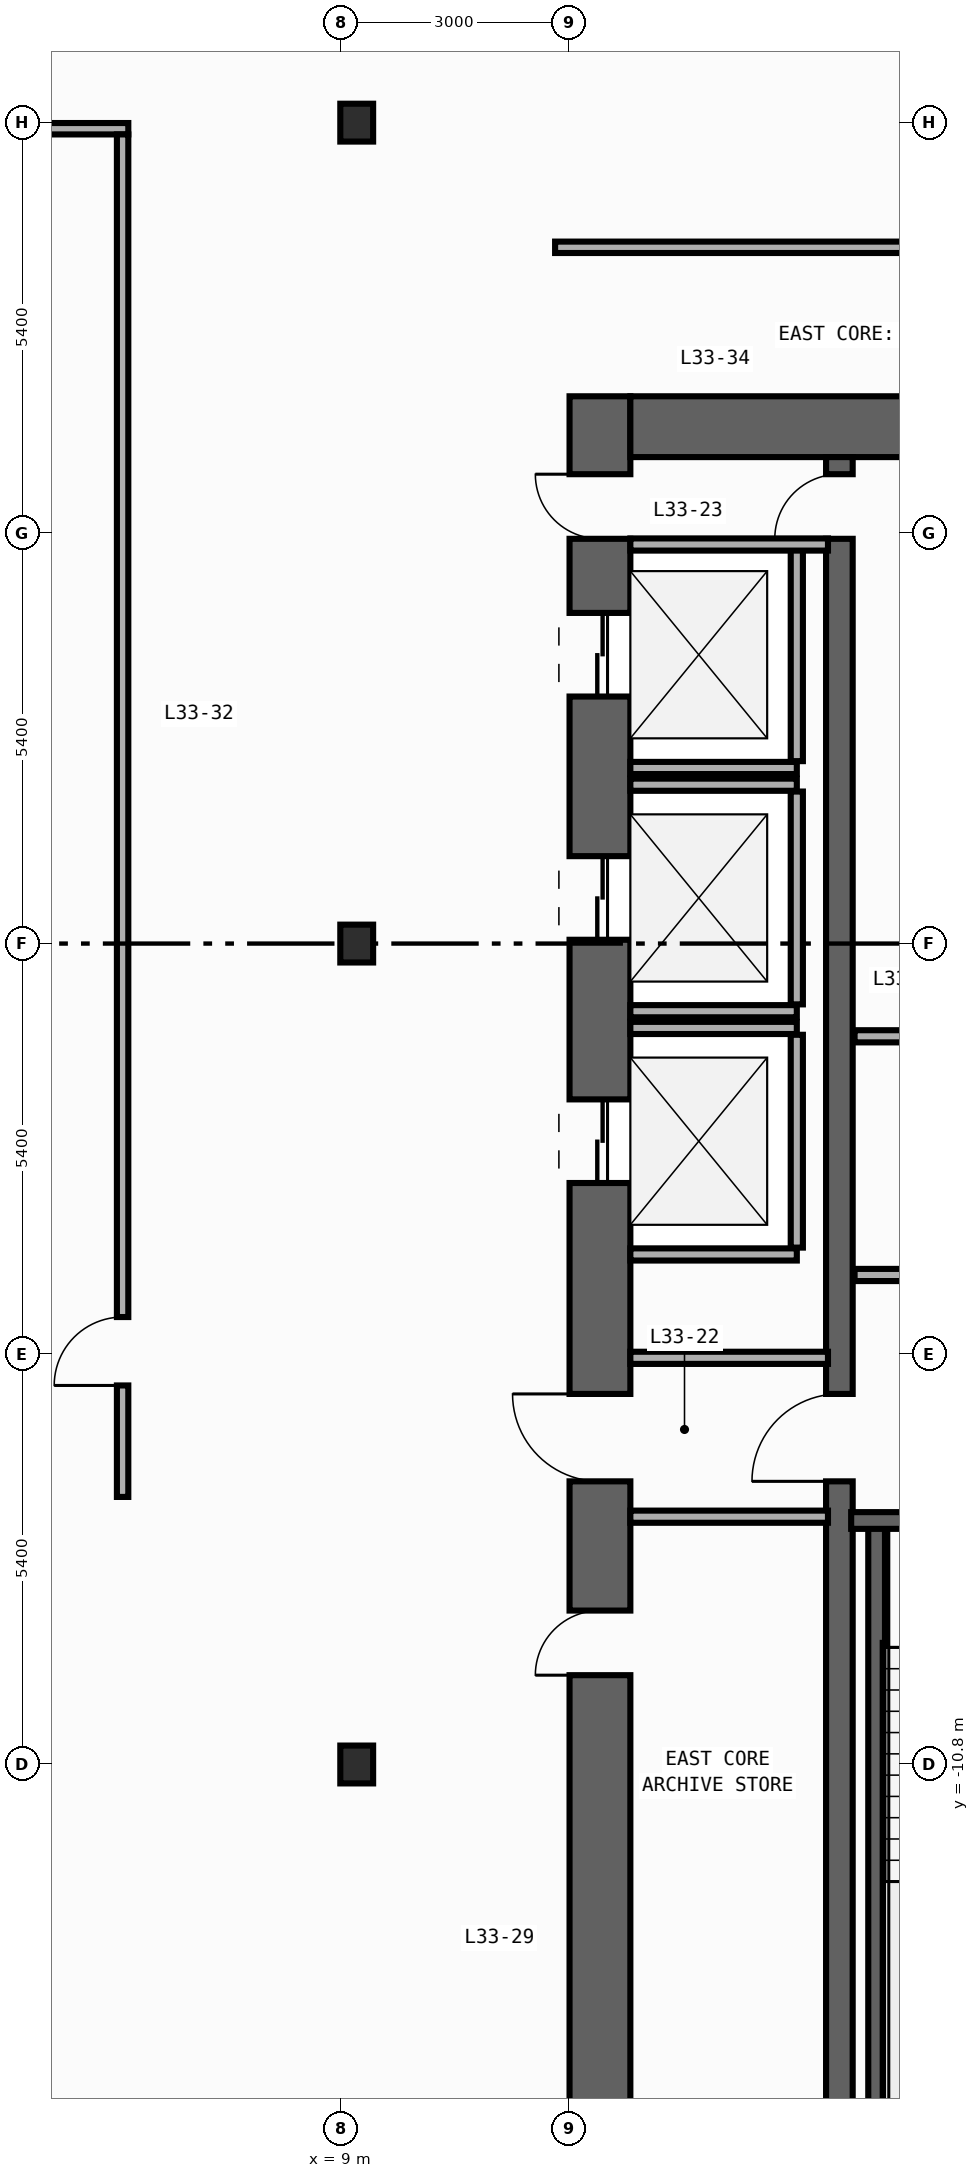
"""IFC4 building model, lengths in metres.
Left out: names, types, materials, properties, quantities, classifications, styles, units other than length and angle.
Written with IfcOpenShell. Run it as: python <this file> out.ifc"""

import sys

from ifc_helpers import new_model, si_unit, direction, frame, frame_2d, origin, origin_2d, place, context, subcontext, project, spatial, rectangle, i_section, extrude, element, fill, save


model = new_model("IFC4")
c1 = context("Model", 3, precision=1e-05, world=origin(), true_north=direction((0.0, 1.0)))
c2 = subcontext(c1, "Body", "Model", "MODEL_VIEW")
j1 = project(units=[si_unit("LENGTHUNIT", "METRE"), si_unit("PLANEANGLEUNIT", "RADIAN")], contexts=[c1])
p1 = place(None, origin())
s1 = spatial("IfcSite", under=j1, at=p1, CompositionType="ELEMENT")
p2 = place(p1, origin())
s2 = spatial("IfcBuilding", under=s1, at=p2, CompositionType="ELEMENT")
p3 = place(p2, frame((0.0, 0.0, 143.6)))
s3 = spatial("IfcBuildingStorey", under=s2, at=p3, CompositionType="ELEMENT", Elevation=143.6)
p4 = place(p3, frame((12.4, -19.8, 0.0), z_axis=(0.0, 0.0, 1.0), x_axis=(0.0, 1.0, 0.0)))
e1 = element("IfcWall", 1, at=p4, inside=s3, PredefinedType="SHEAR", context=c2, shape_type="SweptSolid", body=[
    extrude(rectangle(XDim=27.0, YDim=0.8, at=frame_2d((13.5, 0.0))), origin(), (0.0, 0.0, 1.0), 3.94),
])
p5 = place(p4, frame((23.05, 0.0, 0.0)))
e2 = element("IfcOpeningElement", 2, at=p5, cuts=e1, PredefinedType="OPENING", context=c2, shape_type="SweptSolid", body=[
    extrude(rectangle(XDim=1.1, YDim=2.2, at=frame_2d((0.55, 1.1))), frame((0.0, 0.41, 0.0), z_axis=(0.0, -1.0, 0.0), x_axis=(1.0, 0.0, 0.0)), (0.0, 0.0, 1.0), 0.82),
])
p6 = place(p4, frame((19.85, 0.0, 0.0)))
e3 = element("IfcOpeningElement", 3, at=p6, cuts=e1, PredefinedType="OPENING", context=c2, shape_type="SweptSolid", body=[
    extrude(rectangle(XDim=1.1, YDim=2.2, at=frame_2d((0.55, 1.1))), frame((0.0, 0.41, 0.0), z_axis=(0.0, -1.0, 0.0), x_axis=(1.0, 0.0, 0.0)), (0.0, 0.0, 1.0), 0.82),
])
p7 = place(p4, frame((16.65, 0.0, 0.0)))
e4 = element("IfcOpeningElement", 4, at=p7, cuts=e1, PredefinedType="OPENING", context=c2, shape_type="SweptSolid", body=[
    extrude(rectangle(XDim=1.1, YDim=2.2, at=frame_2d((0.55, 1.1))), frame((0.0, 0.41, 0.0), z_axis=(0.0, -1.0, 0.0), x_axis=(1.0, 0.0, 0.0)), (0.0, 0.0, 1.0), 0.82),
])
p8 = place(p4, frame((10.175, 0.0, 0.0)))
e5 = element("IfcOpeningElement", 5, at=p8, cuts=e1, PredefinedType="OPENING", context=c2, shape_type="SweptSolid", body=[
    extrude(rectangle(XDim=0.85, YDim=2.1, at=frame_2d((0.425, 1.05))), frame((0.0, 0.41, 0.0), z_axis=(0.0, -1.0, 0.0), x_axis=(1.0, 0.0, 0.0)), (0.0, 0.0, 1.0), 0.82),
])
p9 = place(p4, frame((12.725, 0.0, 0.0)))
e6 = element("IfcOpeningElement", 6, at=p9, cuts=e1, PredefinedType="OPENING", context=c2, shape_type="SweptSolid", body=[
    extrude(rectangle(XDim=1.15, YDim=2.2, at=frame_2d((0.575, 1.1))), frame((0.0, 0.41, 0.0), z_axis=(0.0, -1.0, 0.0), x_axis=(1.0, 0.0, 0.0)), (0.0, 0.0, 1.0), 0.82),
])
p10 = place(p4, frame((25.125, 0.0, 0.0)))
e7 = element("IfcOpeningElement", 7, at=p10, cuts=e1, PredefinedType="OPENING", context=c2, shape_type="SweptSolid", body=[
    extrude(rectangle(XDim=0.85, YDim=2.1, at=frame_2d((0.425, 1.05))), frame((0.0, 0.41, 0.0), z_axis=(0.0, -1.0, 0.0), x_axis=(1.0, 0.0, 0.0)), (0.0, 0.0, 1.0), 0.82),
])
p11 = place(p3, frame((12.8, 6.8, 0.0), z_axis=(0.0, 0.0, 1.0), x_axis=(1.0, 0.0, 0.0)))
e8 = element("IfcWall", 8, at=p11, inside=s3, PredefinedType="SHEAR", context=c2, shape_type="SweptSolid", body=[
    extrude(rectangle(XDim=6.8, YDim=0.8, at=frame_2d((3.4, 0.0))), origin(), (0.0, 0.0, 1.0), 3.94),
])
p12 = place(p3, frame((15.55, -19.0, 0.0), z_axis=(0.0, 0.0, 1.0), x_axis=(0.0, 1.0, 0.0)))
e9 = element("IfcWall", 9, at=p12, inside=s3, PredefinedType="SHEAR", context=c2, shape_type="SweptSolid", body=[
    extrude(rectangle(XDim=25.4, YDim=0.35, at=frame_2d((12.7, 0.0))), origin(), (0.0, 0.0, 1.0), 3.94),
])
p13 = place(p12, frame((11.925, 0.0, 0.0)))
e10 = element("IfcOpeningElement", 10, at=p13, cuts=e9, PredefinedType="OPENING", context=c2, shape_type="SweptSolid", body=[
    extrude(rectangle(XDim=1.15, YDim=2.2, at=frame_2d((0.575, 1.1))), frame((0.0, 0.185, 0.0), z_axis=(0.0, -1.0, 0.0), x_axis=(1.0, 0.0, 0.0)), (0.0, 0.0, 1.0), 0.37),
])
p14 = place(p12, frame((24.325, 0.0, 0.0)))
e11 = element("IfcOpeningElement", 11, at=p14, cuts=e9, PredefinedType="OPENING", context=c2, shape_type="SweptSolid", body=[
    extrude(rectangle(XDim=0.85, YDim=2.1, at=frame_2d((0.425, 1.05))), frame((0.0, 0.185, 0.0), z_axis=(0.0, -1.0, 0.0), x_axis=(1.0, 0.0, 0.0)), (0.0, 0.0, 1.0), 0.37),
])
p15 = place(p3, frame((16.04, -18.89, 0.0), z_axis=(0.0, 0.0, 1.0), x_axis=(0.0, 1.0, 0.0)))
e12 = element("IfcWall", 12, at=p15, inside=s3, PredefinedType="SHEAR", context=c2, shape_type="SweptSolid", body=[
    extrude(rectangle(XDim=11.3, YDim=0.22, at=frame_2d((5.65, 0.0))), origin(), (0.0, 0.0, 1.0), 3.94),
])
p16 = place(p3, frame((19.62, -7.59, 0.0), z_axis=(0.0, 0.0, 1.0), x_axis=(-1.0, 0.0, 0.0)))
e13 = element("IfcWall", 13, at=p16, inside=s3, PredefinedType="SHEAR", context=c2, shape_type="SweptSolid", body=[
    extrude(rectangle(XDim=3.915, YDim=0.22, at=frame_2d((1.958, 0.0))), origin(), (0.0, 0.0, 1.0), 3.94),
])
p17 = place(p16, frame((1.08, 0.0, 0.0)))
e14 = element("IfcOpeningElement", 14, at=p17, cuts=e13, PredefinedType="OPENING", context=c2, shape_type="SweptSolid", body=[
    extrude(rectangle(XDim=1.1, YDim=2.2, at=frame_2d((0.55, 1.1))), frame((0.0, 0.12, 0.0), z_axis=(0.0, -1.0, 0.0), x_axis=(1.0, 0.0, 0.0)), (0.0, 0.0, 1.0), 0.24),
])
for number, where, z_axis, x_axis in (
    (15, (9.2, -10.8, 0.0), (0.0, 0.0, 1.0), (1.0, 0.0, 0.0)),
    (16, (9.2, 0.0, 0.0), (0.0, 0.0, 1.0), (1.0, 0.0, 0.0)),
    (17, (9.2, 10.8, 0.0), (0.0, 0.0, 1.0), (1.0, 0.0, 0.0)),
):
    element("IfcColumn", number, at=place(p3, frame(where, z_axis=z_axis, x_axis=x_axis)), inside=s3, PredefinedType="COLUMN", context=c2, shape_type="SweptSolid", body=[
        extrude(i_section(OverallWidth=0.432, OverallDepth=0.498, WebThickness=0.045, FlangeThickness=0.07, FilletRadius=0.022, at=origin_2d()), origin(), (0.0, 0.0, 1.0), 4.2),
    ])
p18 = place(p3, frame((12.8, 2.31, 0.0), z_axis=(0.0, 0.0, 1.0), x_axis=(1.0, 0.0, 0.0)))
e18 = element("IfcWall", 18, at=p18, inside=s3, PredefinedType="STANDARD", context=c2, shape_type="SweptSolid", body=[
    extrude(rectangle(XDim=2.19, YDim=0.16, at=frame_2d((1.095, 0.0))), origin(), (0.0, 0.0, 1.0), 3.94),
])
p19 = place(p3, frame((14.99, 2.4, 0.0), z_axis=(0.0, 0.0, 1.0), x_axis=(0.0, 1.0, 0.0)))
e19 = element("IfcWall", 19, at=p19, inside=s3, PredefinedType="STANDARD", context=c2, shape_type="SweptSolid", body=[
    extrude(rectangle(XDim=2.8, YDim=0.16, at=frame_2d((1.4, 0.0))), origin(), (0.0, 0.0, 1.0), 3.94),
])
for number, where, z_axis, x_axis in (
    (20, (12.8, -0.89, 0.0), (0.0, 0.0, 1.0), (1.0, 0.0, 0.0)),
    (21, (12.8, 2.09, 0.0), (0.0, 0.0, 1.0), (1.0, 0.0, 0.0)),
):
    element("IfcWall", number, at=place(p3, frame(where, z_axis=z_axis, x_axis=x_axis)), inside=s3, PredefinedType="STANDARD", context=c2, shape_type="SweptSolid", body=[
        extrude(rectangle(XDim=2.19, YDim=0.16, at=frame_2d((1.095, 0.0))), origin(), (0.0, 0.0, 1.0), 3.94),
    ])
p20 = place(p3, frame((14.99, -0.8, 0.0), z_axis=(0.0, 0.0, 1.0), x_axis=(0.0, 1.0, 0.0)))
e22 = element("IfcWall", 22, at=p20, inside=s3, PredefinedType="STANDARD", context=c2, shape_type="SweptSolid", body=[
    extrude(rectangle(XDim=2.8, YDim=0.16, at=frame_2d((1.4, 0.0))), origin(), (0.0, 0.0, 1.0), 3.94),
])
for number, where, z_axis, x_axis in (
    (23, (12.8, -4.09, 0.0), (0.0, 0.0, 1.0), (1.0, 0.0, 0.0)),
    (24, (12.8, -1.11, 0.0), (0.0, 0.0, 1.0), (1.0, 0.0, 0.0)),
):
    element("IfcWall", number, at=place(p3, frame(where, z_axis=z_axis, x_axis=x_axis)), inside=s3, PredefinedType="STANDARD", context=c2, shape_type="SweptSolid", body=[
        extrude(rectangle(XDim=2.19, YDim=0.16, at=frame_2d((1.095, 0.0))), origin(), (0.0, 0.0, 1.0), 3.94),
    ])
p21 = place(p3, frame((14.99, -4.0, 0.0), z_axis=(0.0, 0.0, 1.0), x_axis=(0.0, 1.0, 0.0)))
e25 = element("IfcWall", 25, at=p21, inside=s3, PredefinedType="STANDARD", context=c2, shape_type="SweptSolid", body=[
    extrude(rectangle(XDim=2.8, YDim=0.16, at=frame_2d((1.4, 0.0))), origin(), (0.0, 0.0, 1.0), 3.94),
])
p22 = place(p3, frame((15.75, -4.36, 0.0), z_axis=(0.0, 0.0, 1.0), x_axis=(1.0, 0.0, 0.0)))
e26 = element("IfcWall", 26, at=p22, inside=s3, PredefinedType="STANDARD", context=c2, shape_type="SweptSolid", body=[
    extrude(rectangle(XDim=3.8, YDim=0.16, at=frame_2d((1.9, 0.0))), origin(), (0.0, 0.0, 1.0), 3.94),
])
p23 = place(p22, frame((1.47, 0.0, 0.0)))
e27 = element("IfcOpeningElement", 27, at=p23, cuts=e26, PredefinedType="OPENING", context=c2, shape_type="SweptSolid", body=[
    extrude(rectangle(XDim=1.15, YDim=2.2, at=frame_2d((0.575, 1.1))), frame((0.0, 0.09, 0.0), z_axis=(0.0, -1.0, 0.0), x_axis=(1.0, 0.0, 0.0)), (0.0, 0.0, 1.0), 0.18),
])
p24 = place(p3, frame((15.75, -1.22, 0.0), z_axis=(0.0, 0.0, 1.0), x_axis=(1.0, 0.0, 0.0)))
e28 = element("IfcWall", 28, at=p24, inside=s3, PredefinedType="STANDARD", context=c2, shape_type="SweptSolid", body=[
    extrude(rectangle(XDim=3.8, YDim=0.16, at=frame_2d((1.9, 0.0))), origin(), (0.0, 0.0, 1.0), 3.94),
])
for number, where, z_axis, x_axis in (
    (29, (12.8, -5.45, 0.0), (0.0, 0.0, 1.0), (1.0, 0.0, 0.0)),
    (30, (12.8, -7.54, 0.0), (0.0, 0.0, 1.0), (1.0, 0.0, 0.0)),
    (31, (12.8, 5.25, 0.0), (0.0, 0.0, 1.0), (1.0, 0.0, 0.0)),
):
    element("IfcWall", number, at=place(p3, frame(where, z_axis=z_axis, x_axis=x_axis)), inside=s3, PredefinedType="STANDARD", context=c2, shape_type="SweptSolid", body=[
        extrude(rectangle(XDim=2.6, YDim=0.16, at=frame_2d((1.3, 0.0))), origin(), (0.0, 0.0, 1.0), 3.94),
    ])
p25 = place(p3, frame((-10.025, 10.72, 0.0), z_axis=(0.0, 0.0, 1.0), x_axis=(1.0, 0.0, 0.0)))
e32 = element("IfcWall", 32, at=p25, inside=s3, PredefinedType="PARTITIONING", context=c2, shape_type="SweptSolid", body=[
    extrude(rectangle(XDim=16.22, YDim=0.15, at=frame_2d((8.11, 0.0))), origin(), (0.0, 0.0, 1.0), 3.24),
])
p26 = place(p25, frame((11.007, 0.0, 0.0)))
e33 = element("IfcOpeningElement", 33, at=p26, cuts=e32, PredefinedType="OPENING", context=c2, shape_type="SweptSolid", body=[
    extrude(rectangle(XDim=0.9, YDim=2.15, at=frame_2d((0.45, 1.075))), frame((0.0, 0.085, 0.0), z_axis=(0.0, -1.0, 0.0), x_axis=(1.0, 0.0, 0.0)), (0.0, 0.0, 1.0), 0.17),
])
p27 = place(p3, frame((6.12, -7.28, 0.0), z_axis=(0.0, 0.0, 1.0), x_axis=(0.0, 1.0, 0.0)))
e34 = element("IfcWall", 34, at=p27, inside=s3, PredefinedType="PARTITIONING", context=c2, shape_type="SweptSolid", body=[
    extrude(rectangle(XDim=17.925, YDim=0.15, at=frame_2d((8.962, 0.0))), origin(), (0.0, 0.0, 1.0), 3.94),
])
p28 = place(p27, frame((1.467, 0.0, 0.0)))
e35 = element("IfcOpeningElement", 35, at=p28, cuts=e34, PredefinedType="OPENING", context=c2, shape_type="SweptSolid", body=[
    extrude(rectangle(XDim=0.9, YDim=2.15, at=frame_2d((0.45, 1.075))), frame((0.0, 0.085, 0.0), z_axis=(0.0, -1.0, 0.0), x_axis=(1.0, 0.0, 0.0)), (0.0, 0.0, 1.0), 0.17),
])
p29 = place(p3, frame((11.81, 9.16, 0.0), z_axis=(0.0, 0.0, 1.0), x_axis=(1.0, 0.0, 0.0)))
e36 = element("IfcWall", 36, at=p29, inside=s3, PredefinedType="PARTITIONING", context=c2, shape_type="SweptSolid", body=[
    extrude(rectangle(XDim=8.83, YDim=0.15, at=frame_2d((4.415, 0.0))), origin(), (0.0, 0.0, 1.0), 3.94),
])
p30 = place(p29, frame((5.067, 0.0, 0.0)))
e37 = element("IfcOpeningElement", 37, at=p30, cuts=e36, PredefinedType="OPENING", context=c2, shape_type="SweptSolid", body=[
    extrude(rectangle(XDim=0.9, YDim=2.15, at=frame_2d((0.45, 1.075))), frame((0.0, 0.085, 0.0), z_axis=(0.0, -1.0, 0.0), x_axis=(1.0, 0.0, 0.0)), (0.0, 0.0, 1.0), 0.17),
])
p31 = place(p5, origin())
e38 = element("IfcDoor", 38, at=p31, inside=s3, OperationType="DOUBLE_DOOR_SLIDING", PredefinedType="DOOR", context=c2, shape_type="SweptSolid", body=[
    extrude(rectangle(XDim=1.1, YDim=2.2, at=frame_2d((0.55, 1.1))), frame((0.0, 0.025, 0.0), z_axis=(0.0, -1.0, 0.0), x_axis=(1.0, 0.0, 0.0)), (0.0, 0.0, 1.0), 0.05),
])
fill(e2, e38)
p32 = place(p6, origin())
e39 = element("IfcDoor", 39, at=p32, inside=s3, OperationType="DOUBLE_DOOR_SLIDING", PredefinedType="DOOR", context=c2, shape_type="SweptSolid", body=[
    extrude(rectangle(XDim=1.1, YDim=2.2, at=frame_2d((0.55, 1.1))), frame((0.0, 0.025, 0.0), z_axis=(0.0, -1.0, 0.0), x_axis=(1.0, 0.0, 0.0)), (0.0, 0.0, 1.0), 0.05),
])
fill(e3, e39)
p33 = place(p7, origin())
e40 = element("IfcDoor", 40, at=p33, inside=s3, OperationType="DOUBLE_DOOR_SLIDING", PredefinedType="DOOR", context=c2, shape_type="SweptSolid", body=[
    extrude(rectangle(XDim=1.1, YDim=2.2, at=frame_2d((0.55, 1.1))), frame((0.0, 0.025, 0.0), z_axis=(0.0, -1.0, 0.0), x_axis=(1.0, 0.0, 0.0)), (0.0, 0.0, 1.0), 0.05),
])
fill(e4, e40)
p34 = place(p8, origin())
e41 = element("IfcDoor", 41, at=p34, inside=s3, OperationType="SINGLE_SWING_LEFT", PredefinedType="DOOR", context=c2, shape_type="SweptSolid", body=[
    extrude(rectangle(XDim=0.85, YDim=2.1, at=frame_2d((0.425, 1.05))), frame((0.0, 0.025, 0.0), z_axis=(0.0, -1.0, 0.0), x_axis=(1.0, 0.0, 0.0)), (0.0, 0.0, 1.0), 0.05),
])
fill(e5, e41)
p35 = place(p9, origin())
e42 = element("IfcDoor", 42, at=p35, inside=s3, OperationType="SINGLE_SWING_RIGHT", PredefinedType="DOOR", context=c2, shape_type="SweptSolid", body=[
    extrude(rectangle(XDim=1.15, YDim=2.2, at=frame_2d((0.575, 1.1))), frame((0.0, 0.025, 0.0), z_axis=(0.0, -1.0, 0.0), x_axis=(1.0, 0.0, 0.0)), (0.0, 0.0, 1.0), 0.05),
])
fill(e6, e42)
p36 = place(p13, origin())
e43 = element("IfcDoor", 43, at=p36, inside=s3, OperationType="SINGLE_SWING_LEFT", PredefinedType="DOOR", context=c2, shape_type="SweptSolid", body=[
    extrude(rectangle(XDim=1.15, YDim=2.2, at=frame_2d((0.575, 1.1))), frame((0.0, 0.025, 0.0), z_axis=(0.0, -1.0, 0.0), x_axis=(1.0, 0.0, 0.0)), (0.0, 0.0, 1.0), 0.05),
])
fill(e10, e43)
p37 = place(p10, origin())
e44 = element("IfcDoor", 44, at=p37, inside=s3, OperationType="SINGLE_SWING_RIGHT", PredefinedType="DOOR", context=c2, shape_type="SweptSolid", body=[
    extrude(rectangle(XDim=0.85, YDim=2.1, at=frame_2d((0.425, 1.05))), frame((0.0, 0.025, 0.0), z_axis=(0.0, -1.0, 0.0), x_axis=(1.0, 0.0, 0.0)), (0.0, 0.0, 1.0), 0.05),
])
fill(e7, e44)
p38 = place(p14, origin())
e45 = element("IfcDoor", 45, at=p38, inside=s3, OperationType="SINGLE_SWING_LEFT", PredefinedType="DOOR", context=c2, shape_type="SweptSolid", body=[
    extrude(rectangle(XDim=0.85, YDim=2.1, at=frame_2d((0.425, 1.05))), frame((0.0, 0.025, 0.0), z_axis=(0.0, -1.0, 0.0), x_axis=(1.0, 0.0, 0.0)), (0.0, 0.0, 1.0), 0.05),
])
fill(e11, e45)
p39 = place(p28, origin())
e46 = element("IfcDoor", 46, at=p39, inside=s3, OperationType="SINGLE_SWING_LEFT", PredefinedType="DOOR", context=c2, shape_type="SweptSolid", body=[
    extrude(rectangle(XDim=0.9, YDim=2.15, at=frame_2d((0.45, 1.075))), frame((0.0, 0.025, 0.0), z_axis=(0.0, -1.0, 0.0), x_axis=(1.0, 0.0, 0.0)), (0.0, 0.0, 1.0), 0.05),
])
fill(e35, e46)
save(model, sys.argv[1])
